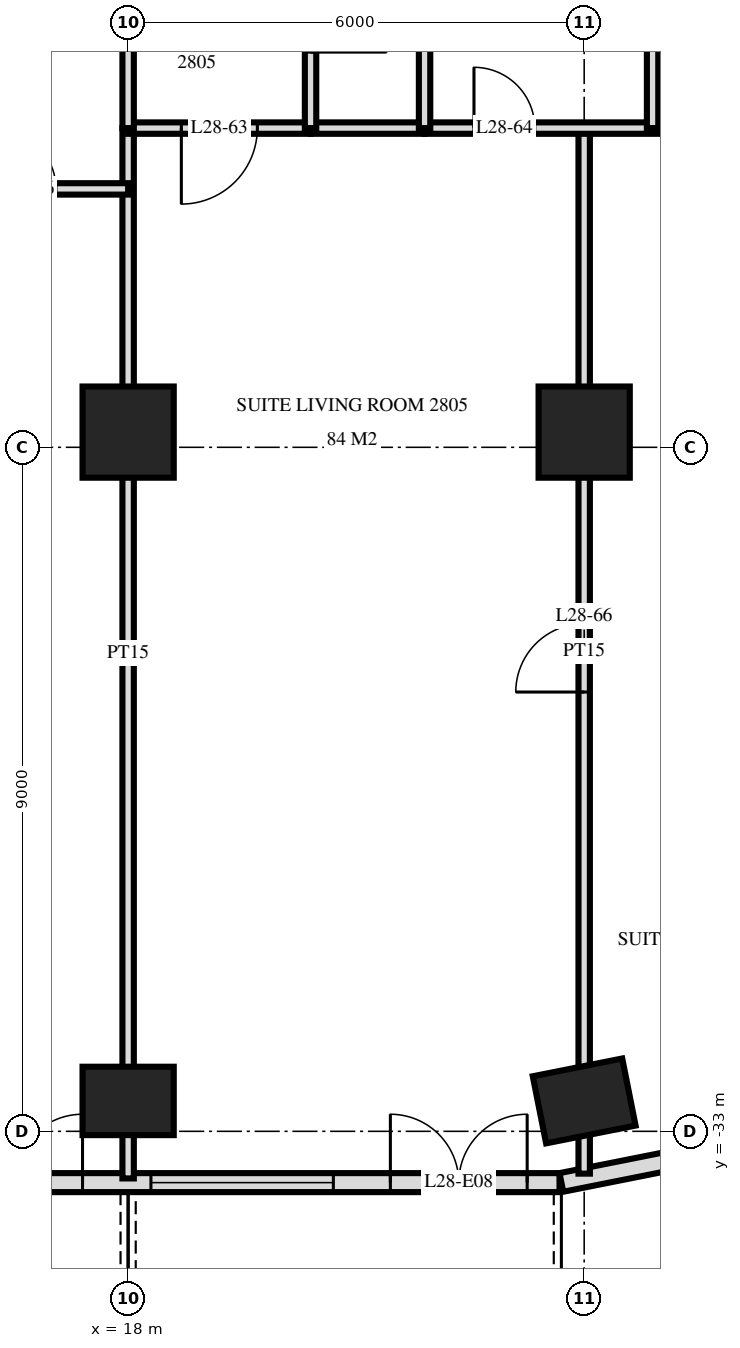
"""IFC4 building model, lengths in metres.
Left out: names, types, materials, properties, quantities, classifications, styles, units other than length and angle.
Written with IfcOpenShell. Run it as: python <this file> out.ifc"""

import sys

from ifc_helpers import new_model, si_unit, direction, frame, frame_2d, origin, origin_2d, place, context, subcontext, project, spatial, rectangle, extrude, element, fill, save


model = new_model("IFC4")
c1 = context("Model", 3, precision=1e-05, world=origin(), true_north=direction((0.0, 1.0)))
c2 = subcontext(c1, "Body", "Model", "MODEL_VIEW")
j1 = project(units=[si_unit("LENGTHUNIT", "METRE"), si_unit("PLANEANGLEUNIT", "RADIAN")], contexts=[c1])
p1 = place(None, origin())
s1 = spatial("IfcSite", under=j1, at=p1, CompositionType="ELEMENT")
p2 = place(p1, origin())
s2 = spatial("IfcBuilding", under=s1, at=p2, CompositionType="ELEMENT")
p3 = place(p2, frame((0.0, 0.0, 112.8)))
s3 = spatial("IfcBuildingStorey", under=s2, at=p3, CompositionType="ELEMENT", Elevation=112.8)
p4 = place(p3, frame((18.0, -32.6, -0.28), z_axis=(0.0, 0.0, 1.0), x_axis=(1.0, 0.0, 0.0)))
e1 = element("IfcColumn", 1, at=p4, inside=s3, PredefinedType="COLUMN", context=c2, shape_type="SweptSolid", body=[
    extrude(rectangle(XDim=1.2, YDim=0.9, at=origin_2d()), origin(), (0.0, 0.0, 1.0), 3.88),
])
p5 = place(p3, frame((18.0, -23.8, -0.28), z_axis=(0.0, 0.0, 1.0), x_axis=(1.0, 0.0, 0.0)))
e2 = element("IfcColumn", 2, at=p5, inside=s3, PredefinedType="COLUMN", context=c2, shape_type="SweptSolid", body=[
    extrude(rectangle(XDim=1.2, YDim=1.2, at=origin_2d()), origin(), (0.0, 0.0, 1.0), 3.88),
])
p6 = place(p3, frame((24.0, -32.6, -0.28), z_axis=(0.0, 0.0, 1.0), x_axis=(0.980792089743, 0.195056086032, 0.0)))
e3 = element("IfcColumn", 3, at=p6, inside=s3, PredefinedType="COLUMN", context=c2, shape_type="SweptSolid", body=[
    extrude(rectangle(XDim=1.2, YDim=0.9, at=origin_2d()), origin(), (0.0, 0.0, 1.0), 3.88),
])
p7 = place(p3, frame((24.0, -23.8, -0.28), z_axis=(0.0, 0.0, 1.0), x_axis=(1.0, 0.0, 0.0)))
e4 = element("IfcColumn", 4, at=p7, inside=s3, PredefinedType="COLUMN", context=c2, shape_type="SweptSolid", body=[
    extrude(rectangle(XDim=1.2, YDim=1.2, at=origin_2d()), origin(), (0.0, 0.0, 1.0), 3.88),
])
p8 = place(p3, frame((-23.675, -33.675, 0.0), z_axis=(0.0, 0.0, 1.0), x_axis=(1.0, 0.0, 0.0)))
e5 = element("IfcWall", 5, at=p8, inside=s3, PredefinedType="SOLIDWALL", context=c2, shape_type="SweptSolid", body=[
    extrude(rectangle(XDim=47.351, YDim=0.25, at=frame_2d((23.675, 0.0))), origin(), (0.0, 0.0, 1.0), 3.32),
])
p9 = place(p8, frame((0.275, 0.0, 0.3)))
e6 = element("IfcOpeningElement", 6, at=p9, cuts=e5, PredefinedType="OPENING", context=c2, shape_type="SweptSolid", body=[
    extrude(rectangle(XDim=2.4, YDim=2.1, at=frame_2d((1.2, 1.05))), frame((0.0, 0.135, 0.0), z_axis=(0.0, -1.0, 0.0), x_axis=(1.0, 0.0, 0.0)), (0.0, 0.0, 1.0), 0.27),
])
p10 = place(p8, frame((3.425, 0.0, 0.0)))
e7 = element("IfcOpeningElement", 7, at=p10, cuts=e5, PredefinedType="OPENING", context=c2, shape_type="SweptSolid", body=[
    extrude(rectangle(XDim=1.8, YDim=2.4, at=frame_2d((0.9, 1.2))), frame((0.0, 0.135, 0.0), z_axis=(0.0, -1.0, 0.0), x_axis=(1.0, 0.0, 0.0)), (0.0, 0.0, 1.0), 0.27),
])
p11 = place(p8, frame((5.975, 0.0, 0.3)))
e8 = element("IfcOpeningElement", 8, at=p11, cuts=e5, PredefinedType="OPENING", context=c2, shape_type="SweptSolid", body=[
    extrude(rectangle(XDim=2.4, YDim=2.1, at=frame_2d((1.2, 1.05))), frame((0.0, 0.135, 0.0), z_axis=(0.0, -1.0, 0.0), x_axis=(1.0, 0.0, 0.0)), (0.0, 0.0, 1.0), 0.27),
])
p12 = place(p8, frame((9.275, 0.0, 0.0)))
e9 = element("IfcOpeningElement", 9, at=p12, cuts=e5, PredefinedType="OPENING", context=c2, shape_type="SweptSolid", body=[
    extrude(rectangle(XDim=1.8, YDim=2.4, at=frame_2d((0.9, 1.2))), frame((0.0, 0.135, 0.0), z_axis=(0.0, -1.0, 0.0), x_axis=(1.0, 0.0, 0.0)), (0.0, 0.0, 1.0), 0.27),
])
p13 = place(p8, frame((12.275, 0.0, 0.0)))
e10 = element("IfcOpeningElement", 10, at=p13, cuts=e5, PredefinedType="OPENING", context=c2, shape_type="SweptSolid", body=[
    extrude(rectangle(XDim=1.8, YDim=2.4, at=frame_2d((0.9, 1.2))), frame((0.0, 0.135, 0.0), z_axis=(0.0, -1.0, 0.0), x_axis=(1.0, 0.0, 0.0)), (0.0, 0.0, 1.0), 0.27),
])
p14 = place(p8, frame((14.975, 0.0, 0.3)))
e11 = element("IfcOpeningElement", 11, at=p14, cuts=e5, PredefinedType="OPENING", context=c2, shape_type="SweptSolid", body=[
    extrude(rectangle(XDim=2.4, YDim=2.1, at=frame_2d((1.2, 1.05))), frame((0.0, 0.135, 0.0), z_axis=(0.0, -1.0, 0.0), x_axis=(1.0, 0.0, 0.0)), (0.0, 0.0, 1.0), 0.27),
])
p15 = place(p8, frame((17.975, 0.0, 0.3)))
e12 = element("IfcOpeningElement", 12, at=p15, cuts=e5, PredefinedType="OPENING", context=c2, shape_type="SweptSolid", body=[
    extrude(rectangle(XDim=2.4, YDim=2.1, at=frame_2d((1.2, 1.05))), frame((0.0, 0.135, 0.0), z_axis=(0.0, -1.0, 0.0), x_axis=(1.0, 0.0, 0.0)), (0.0, 0.0, 1.0), 0.27),
])
p16 = place(p8, frame((21.275, 0.0, 0.0)))
e13 = element("IfcOpeningElement", 13, at=p16, cuts=e5, PredefinedType="OPENING", context=c2, shape_type="SweptSolid", body=[
    extrude(rectangle(XDim=1.8, YDim=2.4, at=frame_2d((0.9, 1.2))), frame((0.0, 0.135, 0.0), z_axis=(0.0, -1.0, 0.0), x_axis=(1.0, 0.0, 0.0)), (0.0, 0.0, 1.0), 0.27),
])
p17 = place(p8, frame((24.275, 0.0, 0.0)))
e14 = element("IfcOpeningElement", 14, at=p17, cuts=e5, PredefinedType="OPENING", context=c2, shape_type="SweptSolid", body=[
    extrude(rectangle(XDim=1.8, YDim=2.4, at=frame_2d((0.9, 1.2))), frame((0.0, 0.135, 0.0), z_axis=(0.0, -1.0, 0.0), x_axis=(1.0, 0.0, 0.0)), (0.0, 0.0, 1.0), 0.27),
])
p18 = place(p8, frame((26.975, 0.0, 0.3)))
e15 = element("IfcOpeningElement", 15, at=p18, cuts=e5, PredefinedType="OPENING", context=c2, shape_type="SweptSolid", body=[
    extrude(rectangle(XDim=2.4, YDim=2.1, at=frame_2d((1.2, 1.05))), frame((0.0, 0.135, 0.0), z_axis=(0.0, -1.0, 0.0), x_axis=(1.0, 0.0, 0.0)), (0.0, 0.0, 1.0), 0.27),
])
p19 = place(p8, frame((30.275, 0.0, 0.0)))
e16 = element("IfcOpeningElement", 16, at=p19, cuts=e5, PredefinedType="OPENING", context=c2, shape_type="SweptSolid", body=[
    extrude(rectangle(XDim=1.8, YDim=2.4, at=frame_2d((0.9, 1.2))), frame((0.0, 0.135, 0.0), z_axis=(0.0, -1.0, 0.0), x_axis=(1.0, 0.0, 0.0)), (0.0, 0.0, 1.0), 0.27),
])
p20 = place(p8, frame((32.975, 0.0, 0.3)))
e17 = element("IfcOpeningElement", 17, at=p20, cuts=e5, PredefinedType="OPENING", context=c2, shape_type="SweptSolid", body=[
    extrude(rectangle(XDim=2.4, YDim=2.1, at=frame_2d((1.2, 1.05))), frame((0.0, 0.135, 0.0), z_axis=(0.0, -1.0, 0.0), x_axis=(1.0, 0.0, 0.0)), (0.0, 0.0, 1.0), 0.27),
])
p21 = place(p8, frame((35.975, 0.0, 0.3)))
e18 = element("IfcOpeningElement", 18, at=p21, cuts=e5, PredefinedType="OPENING", context=c2, shape_type="SweptSolid", body=[
    extrude(rectangle(XDim=2.4, YDim=2.1, at=frame_2d((1.2, 1.05))), frame((0.0, 0.135, 0.0), z_axis=(0.0, -1.0, 0.0), x_axis=(1.0, 0.0, 0.0)), (0.0, 0.0, 1.0), 0.27),
])
p22 = place(p8, frame((39.275, 0.0, 0.0)))
e19 = element("IfcOpeningElement", 19, at=p22, cuts=e5, PredefinedType="OPENING", context=c2, shape_type="SweptSolid", body=[
    extrude(rectangle(XDim=1.8, YDim=2.4, at=frame_2d((0.9, 1.2))), frame((0.0, 0.135, 0.0), z_axis=(0.0, -1.0, 0.0), x_axis=(1.0, 0.0, 0.0)), (0.0, 0.0, 1.0), 0.27),
])
p23 = place(p8, frame((41.975, 0.0, 0.3)))
e20 = element("IfcOpeningElement", 20, at=p23, cuts=e5, PredefinedType="OPENING", context=c2, shape_type="SweptSolid", body=[
    extrude(rectangle(XDim=2.4, YDim=2.1, at=frame_2d((1.2, 1.05))), frame((0.0, 0.135, 0.0), z_axis=(0.0, -1.0, 0.0), x_axis=(1.0, 0.0, 0.0)), (0.0, 0.0, 1.0), 0.27),
])
p24 = place(p8, frame((45.125, 0.0, 0.0)))
e21 = element("IfcOpeningElement", 21, at=p24, cuts=e5, PredefinedType="OPENING", context=c2, shape_type="SweptSolid", body=[
    extrude(rectangle(XDim=1.8, YDim=2.4, at=frame_2d((0.9, 1.2))), frame((0.0, 0.135, 0.0), z_axis=(0.0, -1.0, 0.0), x_axis=(1.0, 0.0, 0.0)), (0.0, 0.0, 1.0), 0.27),
])
p25 = place(p3, frame((23.7, -33.673, 0.0), z_axis=(0.0, 0.0, 1.0), x_axis=(0.980775640221, 0.19513878023, 0.0)))
e22 = element("IfcWall", 22, at=p25, inside=s3, PredefinedType="SOLIDWALL", context=c2, shape_type="SweptSolid", body=[
    extrude(rectangle(XDim=1.681, YDim=0.25, at=frame_2d((0.841, 0.0))), origin(), (0.0, 0.0, 1.0), 3.32),
])
p26 = place(p3, frame((24.9, -19.8, 0.0), z_axis=(0.0, 0.0, 1.0), x_axis=(0.0, 1.0, 0.0)))
e23 = element("IfcWall", 23, at=p26, inside=s3, PredefinedType="PARTITIONING", context=c2, shape_type="SweptSolid", body=[
    extrude(rectangle(XDim=3.0, YDim=0.15, at=frame_2d((1.5, 0.0))), origin(), (0.0, 0.0, 1.0), 3.32),
])
p27 = place(p3, frame((24.0, -33.557, 0.0), z_axis=(0.0, 0.0, 1.0), x_axis=(0.0, 1.0, 0.0)))
e24 = element("IfcWall", 24, at=p27, inside=s3, PredefinedType="PARTITIONING", context=c2, shape_type="SweptSolid", body=[
    extrude(rectangle(XDim=13.757, YDim=0.15, at=frame_2d((6.878, 0.0))), origin(), (0.0, 0.0, 1.0), 3.32),
])
p28 = place(p27, frame((6.337, 0.0, 0.0)))
e25 = element("IfcOpeningElement", 25, at=p28, cuts=e24, PredefinedType="OPENING", context=c2, shape_type="SweptSolid", body=[
    extrude(rectangle(XDim=0.9, YDim=2.1, at=frame_2d((0.45, 1.05))), frame((0.0, 0.085, 0.0), z_axis=(0.0, -1.0, 0.0), x_axis=(1.0, 0.0, 0.0)), (0.0, 0.0, 1.0), 0.17),
])
p29 = place(p3, frame((21.9, -19.8, 0.0), z_axis=(0.0, 0.0, 1.0), x_axis=(0.0, 1.0, 0.0)))
e26 = element("IfcWall", 26, at=p29, inside=s3, PredefinedType="PLUMBINGWALL", context=c2, shape_type="SweptSolid", body=[
    extrude(rectangle(XDim=3.0, YDim=0.15, at=frame_2d((1.5, 0.0))), origin(), (0.0, 0.0, 1.0), 3.32),
])
p30 = place(p3, frame((20.4, -19.8, 0.0), z_axis=(0.0, 0.0, 1.0), x_axis=(0.0, 1.0, 0.0)))
e27 = element("IfcWall", 27, at=p30, inside=s3, PredefinedType="PARTITIONING", context=c2, shape_type="SweptSolid", body=[
    extrude(rectangle(XDim=3.0, YDim=0.15, at=frame_2d((1.5, 0.0))), origin(), (0.0, 0.0, 1.0), 3.32),
])
p31 = place(p30, frame((1.0, 0.0, 0.0)))
e28 = element("IfcOpeningElement", 28, at=p31, cuts=e27, PredefinedType="OPENING", context=c2, shape_type="SweptSolid", body=[
    extrude(rectangle(XDim=1.0, YDim=2.1, at=frame_2d((0.5, 1.05))), frame((0.0, 0.085, 0.0), z_axis=(0.0, -1.0, 0.0), x_axis=(1.0, 0.0, 0.0)), (0.0, 0.0, 1.0), 0.17),
])
p32 = place(p3, frame((18.0, -19.8, 0.0), z_axis=(0.0, 0.0, 1.0), x_axis=(0.0, 1.0, 0.0)))
e29 = element("IfcWall", 29, at=p32, inside=s3, PredefinedType="PARTITIONING", context=c2, shape_type="SweptSolid", body=[
    extrude(rectangle(XDim=3.0, YDim=0.15, at=frame_2d((1.5, 0.0))), origin(), (0.0, 0.0, 1.0), 3.32),
])
p33 = place(p3, frame((18.0, -33.62, 0.0), z_axis=(0.0, 0.0, 1.0), x_axis=(0.0, 1.0, 0.0)))
e30 = element("IfcWall", 30, at=p33, inside=s3, PredefinedType="PARTITIONING", context=c2, shape_type="SweptSolid", body=[
    extrude(rectangle(XDim=13.82, YDim=0.15, at=frame_2d((6.91, 0.0))), origin(), (0.0, 0.0, 1.0), 3.32),
])
p34 = place(p3, frame((13.8, -20.6, 0.0), z_axis=(0.0, 0.0, 1.0), x_axis=(1.0, 0.0, 0.0)))
e31 = element("IfcWall", 31, at=p34, inside=s3, PredefinedType="PARTITIONING", context=c2, shape_type="SweptSolid", body=[
    extrude(rectangle(XDim=4.2, YDim=0.15, at=frame_2d((2.1, 0.0))), origin(), (0.0, 0.0, 1.0), 3.32),
])
p35 = place(p34, frame((2.45, 0.0, 0.0)))
e32 = element("IfcOpeningElement", 32, at=p35, cuts=e31, PredefinedType="OPENING", context=c2, shape_type="SweptSolid", body=[
    extrude(rectangle(XDim=0.8, YDim=2.1, at=frame_2d((0.4, 1.05))), frame((0.0, 0.085, 0.0), z_axis=(0.0, -1.0, 0.0), x_axis=(1.0, 0.0, 0.0)), (0.0, 0.0, 1.0), 0.17),
])
p36 = place(p3, frame((18.0, -19.8, 0.0), z_axis=(0.0, 0.0, 1.0), x_axis=(1.0, 0.0, 0.0)))
e33 = element("IfcWall", 33, at=p36, inside=s3, PredefinedType="PARTITIONING", context=c2, shape_type="SweptSolid", body=[
    extrude(rectangle(XDim=2.4, YDim=0.15, at=frame_2d((1.2, 0.0))), origin(), (0.0, 0.0, 1.0), 3.32),
])
p37 = place(p36, frame((0.7, 0.0, 0.0)))
e34 = element("IfcOpeningElement", 34, at=p37, cuts=e33, PredefinedType="OPENING", context=c2, shape_type="SweptSolid", body=[
    extrude(rectangle(XDim=1.0, YDim=2.1, at=frame_2d((0.5, 1.05))), frame((0.0, 0.085, 0.0), z_axis=(0.0, -1.0, 0.0), x_axis=(1.0, 0.0, 0.0)), (0.0, 0.0, 1.0), 0.17),
])
p38 = place(p3, frame((21.9, -19.8, 0.0), z_axis=(0.0, 0.0, 1.0), x_axis=(1.0, 0.0, 0.0)))
e35 = element("IfcWall", 35, at=p38, inside=s3, PredefinedType="PARTITIONING", context=c2, shape_type="SweptSolid", body=[
    extrude(rectangle(XDim=6.12, YDim=0.15, at=frame_2d((3.06, 0.0))), origin(), (0.0, 0.0, 1.0), 3.32),
])
p39 = place(p38, frame((0.65, 0.0, 0.0)))
e36 = element("IfcOpeningElement", 36, at=p39, cuts=e35, PredefinedType="OPENING", context=c2, shape_type="SweptSolid", body=[
    extrude(rectangle(XDim=0.8, YDim=2.1, at=frame_2d((0.4, 1.05))), frame((0.0, 0.085, 0.0), z_axis=(0.0, -1.0, 0.0), x_axis=(1.0, 0.0, 0.0)), (0.0, 0.0, 1.0), 0.17),
])
p40 = place(p38, frame((4.2, 0.0, 0.0)))
e37 = element("IfcOpeningElement", 37, at=p40, cuts=e35, PredefinedType="OPENING", context=c2, shape_type="SweptSolid", body=[
    extrude(rectangle(XDim=0.9, YDim=2.1, at=frame_2d((0.45, 1.05))), frame((0.0, 0.085, 0.0), z_axis=(0.0, -1.0, 0.0), x_axis=(1.0, 0.0, 0.0)), (0.0, 0.0, 1.0), 0.17),
])
p41 = place(p3, frame((20.4, -19.8, 0.0), z_axis=(0.0, 0.0, 1.0), x_axis=(1.0, 0.0, 0.0)))
e38 = element("IfcWall", 38, at=p41, inside=s3, PredefinedType="PLUMBINGWALL", context=c2, shape_type="SweptSolid", body=[
    extrude(rectangle(XDim=1.5, YDim=0.15, at=frame_2d((0.75, 0.0))), origin(), (0.0, 0.0, 1.0), 3.32),
])
p42 = place(p22, origin())
e39 = element("IfcDoor", 39, at=p42, inside=s3, OperationType="DOUBLE_DOOR_SINGLE_SWING", PredefinedType="DOOR", context=c2, shape_type="SweptSolid", body=[
    extrude(rectangle(XDim=1.8, YDim=2.4, at=frame_2d((0.9, 1.2))), frame((0.0, 0.025, 0.0), z_axis=(0.0, -1.0, 0.0), x_axis=(1.0, 0.0, 0.0)), (0.0, 0.0, 1.0), 0.05),
])
fill(e19, e39)
p43 = place(p23, origin())
e40 = element("IfcWindow", 40, at=p43, inside=s3, PartitioningType="SINGLE_PANEL", PredefinedType="WINDOW", context=c2, shape_type="SweptSolid", body=[
    extrude(rectangle(XDim=2.4, YDim=2.1, at=frame_2d((1.2, 1.05))), frame((0.0, 0.03, 0.0), z_axis=(0.0, -1.0, 0.0), x_axis=(1.0, 0.0, 0.0)), (0.0, 0.0, 1.0), 0.06),
])
fill(e20, e40)
p44 = place(p24, origin())
e41 = element("IfcDoor", 41, at=p44, inside=s3, OperationType="DOUBLE_DOOR_SINGLE_SWING", PredefinedType="DOOR", context=c2, shape_type="SweptSolid", body=[
    extrude(rectangle(XDim=1.8, YDim=2.4, at=frame_2d((0.9, 1.2))), frame((0.0, 0.025, 0.0), z_axis=(0.0, -1.0, 0.0), x_axis=(1.0, 0.0, 0.0)), (0.0, 0.0, 1.0), 0.05),
])
fill(e21, e41)
p45 = place(p35, origin())
e42 = element("IfcDoor", 42, at=p45, inside=s3, OperationType="SINGLE_SWING_RIGHT", PredefinedType="DOOR", context=c2, shape_type="SweptSolid", body=[
    extrude(rectangle(XDim=0.8, YDim=2.1, at=frame_2d((0.4, 1.05))), frame((0.0, 0.025, 0.0), z_axis=(0.0, -1.0, 0.0), x_axis=(1.0, 0.0, 0.0)), (0.0, 0.0, 1.0), 0.05),
])
fill(e32, e42)
p46 = place(p37, frame((0.5, 0.0, 0.0), z_axis=(0.0, 0.0, 1.0), x_axis=(-1.0, 0.0, 0.0)))
e43 = element("IfcDoor", 43, at=p46, inside=s3, OperationType="SINGLE_SWING_LEFT", PredefinedType="DOOR", context=c2, shape_type="SweptSolid", body=[
    extrude(rectangle(XDim=1.0, YDim=2.1, at=frame_2d((0.0, 1.05))), frame((0.0, -0.025, 0.0), z_axis=(0.0, 1.0, 0.0), x_axis=(-1.0, 0.0, 0.0)), (0.0, 0.0, 1.0), 0.05),
])
fill(e34, e43)
p47 = place(p39, origin())
e44 = element("IfcDoor", 44, at=p47, inside=s3, OperationType="SINGLE_SWING_RIGHT", PredefinedType="DOOR", context=c2, shape_type="SweptSolid", body=[
    extrude(rectangle(XDim=0.8, YDim=2.1, at=frame_2d((0.4, 1.05))), frame((0.0, 0.025, 0.0), z_axis=(0.0, -1.0, 0.0), x_axis=(1.0, 0.0, 0.0)), (0.0, 0.0, 1.0), 0.05),
])
fill(e36, e44)
p48 = place(p28, origin())
e45 = element("IfcDoor", 45, at=p48, inside=s3, OperationType="SINGLE_SWING_RIGHT", PredefinedType="DOOR", context=c2, shape_type="SweptSolid", body=[
    extrude(rectangle(XDim=0.9, YDim=2.1, at=frame_2d((0.45, 1.05))), frame((0.0, 0.025, 0.0), z_axis=(0.0, -1.0, 0.0), x_axis=(1.0, 0.0, 0.0)), (0.0, 0.0, 1.0), 0.05),
])
fill(e25, e45)
save(model, sys.argv[1])
